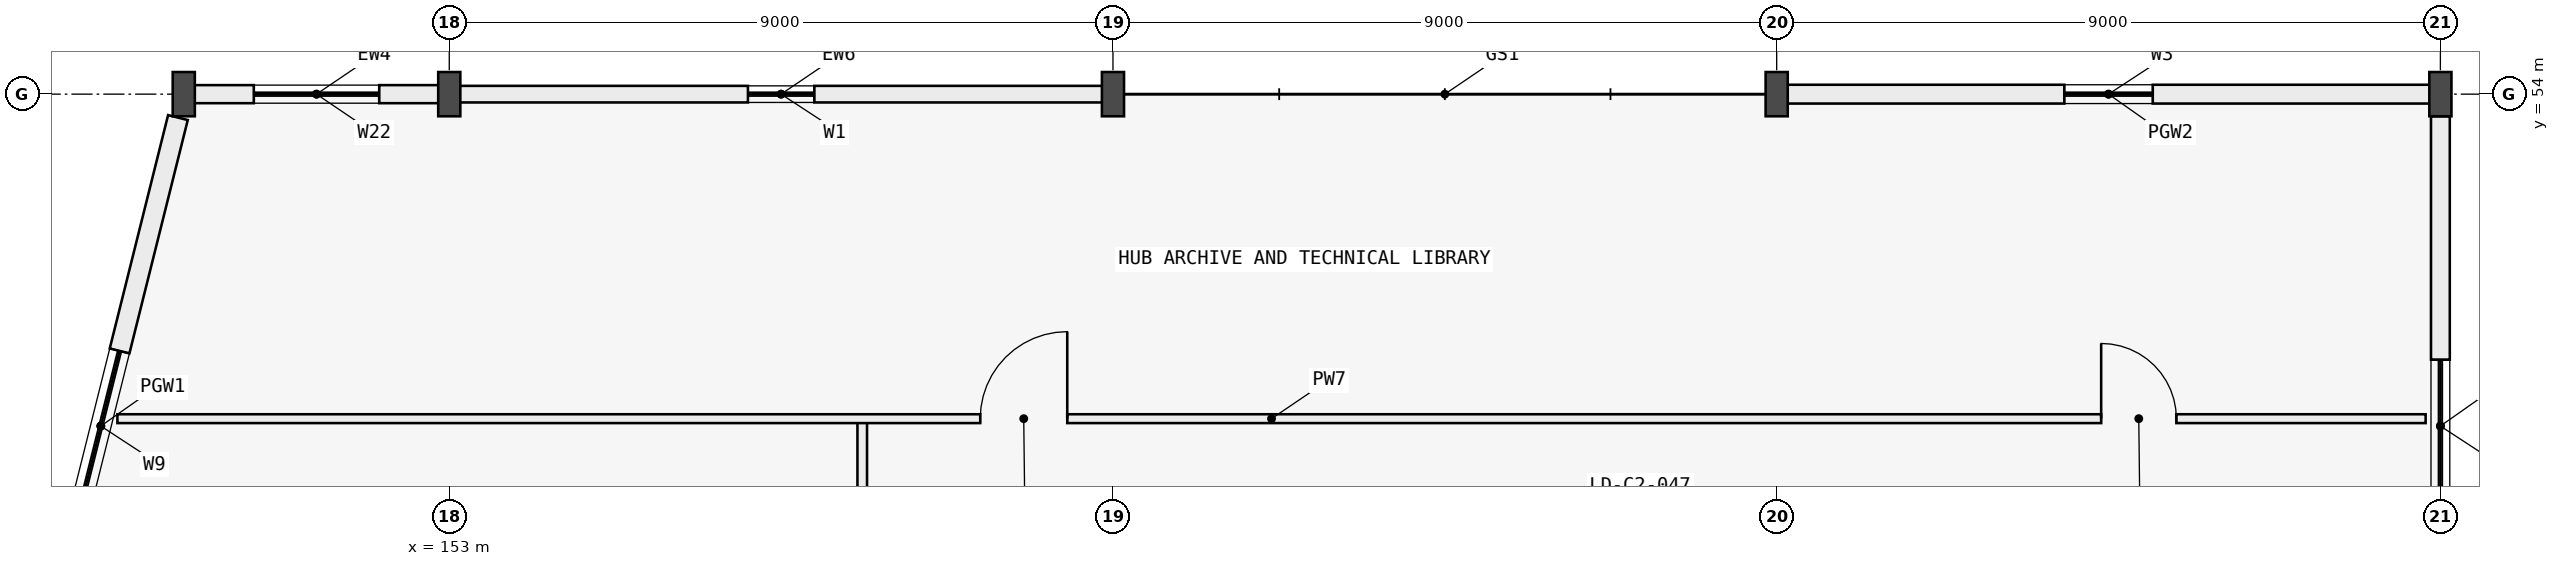
"""IFC4 building model, lengths in metres.
Left out: names, types, materials, properties, quantities, classifications, styles, units other than length and angle.
Written with IfcOpenShell. Run it as: python <this file> out.ifc"""

import sys

from ifc_helpers import new_model, si_unit, direction, frame, frame_2d, origin, origin_2d, place, context, subcontext, project, spatial, rectangle, i_section, extrude, element, fill, save


model = new_model("IFC4")
c1 = context("Model", 3, precision=1e-05, world=origin(), true_north=direction((0.0, 1.0)))
c2 = subcontext(c1, "Body", "Model", "MODEL_VIEW")
j1 = project(units=[si_unit("LENGTHUNIT", "METRE"), si_unit("PLANEANGLEUNIT", "RADIAN")], contexts=[c1])
p1 = place(None, origin())
s1 = spatial("IfcSite", under=j1, at=p1, CompositionType="ELEMENT")
p2 = place(p1, origin())
s2 = spatial("IfcBuilding", under=s1, at=p2, CompositionType="ELEMENT")
p3 = place(p2, frame((0.0, 0.0, 25.2)))
s3 = spatial("IfcBuildingStorey", under=s2, at=p3, CompositionType="ELEMENT", Elevation=25.2)
for number, where, z_axis, x_axis in (
    (1, (149.4, 54.0, 0.0), (0.0, 0.0, 1.0), (1.0, 0.0, 0.0)),
    (2, (153.0, 54.0, 0.0), (0.0, 0.0, 1.0), (1.0, 0.0, 0.0)),
    (3, (162.0, 54.0, 0.0), (0.0, 0.0, 1.0), (1.0, 0.0, 0.0)),
    (4, (171.0, 54.0, 0.0), (0.0, 0.0, 1.0), (1.0, 0.0, 0.0)),
    (5, (180.0, 54.0, 0.0), (0.0, 0.0, 1.0), (1.0, 0.0, 0.0)),
):
    element("IfcColumn", number, at=place(p3, frame(where, z_axis=z_axis, x_axis=x_axis)), inside=s3, PredefinedType="COLUMN", context=c2, shape_type="SweptSolid", body=[
        extrude(i_section(OverallWidth=0.3, OverallDepth=0.6, WebThickness=0.015, FlangeThickness=0.03, FilletRadius=0.027, at=origin_2d()), origin(), (0.0, 0.0, 1.0), 4.2),
    ])
p4 = place(p3, frame((180.0, 45.3, 0.0), z_axis=(0.0, 0.0, 1.0), x_axis=(0.0, 1.0, 0.0)))
e6 = element("IfcWall", 6, at=p4, inside=s3, PredefinedType="POLYGONAL", context=c2, shape_type="SweptSolid", body=[
    extrude(rectangle(XDim=8.4, YDim=0.255, at=frame_2d((4.2, 0.0))), origin(), (0.0, 0.0, 1.0), 3.635),
])
p5 = place(p4, frame((3.3, 0.0, 0.95)))
e7 = element("IfcOpeningElement", 7, at=p5, cuts=e6, PredefinedType="OPENING", context=c2, shape_type="SweptSolid", body=[
    extrude(rectangle(XDim=1.8, YDim=1.6, at=frame_2d((0.9, 0.8))), frame((0.0, 0.137, 0.0), z_axis=(0.0, -1.0, 0.0), x_axis=(1.0, 0.0, 0.0)), (0.0, 0.0, 1.0), 0.275),
])
p6 = place(p3, frame((149.408, 54.0, 0.0), z_axis=(0.0, 0.0, 1.0), x_axis=(1.0, 0.0, 0.0)))
e8 = element("IfcWall", 8, at=p6, inside=s3, PredefinedType="STANDARD", context=c2, shape_type="SweptSolid", body=[
    extrude(rectangle(XDim=3.584, YDim=0.245, at=frame_2d((1.792, 0.0))), origin(), (0.0, 0.0, 1.0), 3.635),
])
p7 = place(p6, frame((0.942, 0.0, 0.95)))
e9 = element("IfcOpeningElement", 9, at=p7, cuts=e8, PredefinedType="OPENING", context=c2, shape_type="SweptSolid", body=[
    extrude(rectangle(XDim=1.7, YDim=2.1, at=frame_2d((0.85, 1.05))), frame((0.0, 0.133, 0.0), z_axis=(0.0, -1.0, 0.0), x_axis=(1.0, 0.0, 0.0)), (0.0, 0.0, 1.0), 0.265),
])
p8 = place(p3, frame((153.008, 54.0, 0.0), z_axis=(0.0, 0.0, 1.0), x_axis=(1.0, 0.0, 0.0)))
e10 = element("IfcWall", 10, at=p8, inside=s3, PredefinedType="STANDARD", context=c2, shape_type="SweptSolid", body=[
    extrude(rectangle(XDim=8.984, YDim=0.225, at=frame_2d((4.492, 0.0))), origin(), (0.0, 0.0, 1.0), 3.635),
])
p9 = place(p8, frame((4.042, 0.0, 0.95)))
e11 = element("IfcOpeningElement", 11, at=p9, cuts=e10, PredefinedType="OPENING", context=c2, shape_type="SweptSolid", body=[
    extrude(rectangle(XDim=0.9, YDim=1.2, at=frame_2d((0.45, 0.6))), frame((0.0, 0.123, 0.0), z_axis=(0.0, -1.0, 0.0), x_axis=(1.0, 0.0, 0.0)), (0.0, 0.0, 1.0), 0.245),
])
p10 = place(p3, frame((171.008, 54.0, 0.0), z_axis=(0.0, 0.0, 1.0), x_axis=(1.0, 0.0, 0.0)))
e12 = element("IfcWall", 12, at=p10, inside=s3, PredefinedType="POLYGONAL", context=c2, shape_type="SweptSolid", body=[
    extrude(rectangle(XDim=8.984, YDim=0.255, at=frame_2d((4.492, 0.0))), origin(), (0.0, 0.0, 1.0), 3.635),
])
p11 = place(p10, frame((3.892, 0.0, 0.95)))
e13 = element("IfcOpeningElement", 13, at=p11, cuts=e12, PredefinedType="OPENING", context=c2, shape_type="SweptSolid", body=[
    extrude(rectangle(XDim=1.2, YDim=1.35, at=frame_2d((0.6, 0.675))), frame((0.0, 0.137, 0.0), z_axis=(0.0, -1.0, 0.0), x_axis=(1.0, 0.0, 0.0)), (0.0, 0.0, 1.0), 0.275),
])
p12 = place(p3, frame((147.229, 45.318, 0.0), z_axis=(0.0, 0.0, 1.0), x_axis=(0.24252230007, 0.97014583129, 0.0)))
e14 = element("IfcWall", 14, at=p12, inside=s3, PredefinedType="POLYGONAL", context=c2, shape_type="SweptSolid", body=[
    extrude(rectangle(XDim=8.622, YDim=0.275, at=frame_2d((4.311, 0.0))), origin(), (0.0, 0.0, 1.0), 3.96),
])
p13 = place(p12, frame((3.261, 0.0, 0.95)))
e15 = element("IfcOpeningElement", 15, at=p13, cuts=e14, PredefinedType="OPENING", context=c2, shape_type="SweptSolid", body=[
    extrude(rectangle(XDim=2.1, YDim=1.7, at=frame_2d((1.05, 0.85))), frame((0.0, 0.147, 0.0), z_axis=(0.0, -1.0, 0.0), x_axis=(1.0, 0.0, 0.0)), (0.0, 0.0, 1.0), 0.295),
])
p14 = place(p3, frame((158.6, 36.2, 0.0), z_axis=(0.0, 0.0, 1.0), x_axis=(0.0, 1.0, 0.0)))
e16 = element("IfcWall", 16, at=p14, inside=s3, PredefinedType="PARTITIONING", context=c2, shape_type="SweptSolid", body=[
    extrude(rectangle(XDim=13.4, YDim=0.13, at=frame_2d((6.7, 0.0))), origin(), (0.0, 0.0, 1.0), 3.665),
])
p15 = place(p14, frame((6.1, 0.0, 0.0)))
e17 = element("IfcOpeningElement", 17, at=p15, cuts=e16, PredefinedType="OPENING", context=c2, shape_type="SweptSolid", body=[
    extrude(rectangle(XDim=1.08, YDim=2.12, at=frame_2d((0.54, 1.06))), frame((0.0, 0.075, 0.0), z_axis=(0.0, -1.0, 0.0), x_axis=(1.0, 0.0, 0.0)), (0.0, 0.0, 1.0), 0.15),
])
p16 = place(p3, frame((148.5, 49.6, 0.0), z_axis=(0.0, 0.0, 1.0), x_axis=(1.0, 0.0, 0.0)))
e18 = element("IfcWall", 18, at=p16, inside=s3, PredefinedType="PARTITIONING", context=c2, shape_type="SweptSolid", body=[
    extrude(rectangle(XDim=31.3, YDim=0.12, at=frame_2d((15.65, 0.0))), origin(), (0.0, 0.0, 1.0), 3.96),
])
p17 = place(p16, frame((11.7, 0.0, 0.0)))
e19 = element("IfcOpeningElement", 19, at=p17, cuts=e18, PredefinedType="OPENING", context=c2, shape_type="SweptSolid", body=[
    extrude(rectangle(XDim=1.18, YDim=2.15, at=frame_2d((0.59, 1.075))), frame((0.0, 0.07, 0.0), z_axis=(0.0, -1.0, 0.0), x_axis=(1.0, 0.0, 0.0)), (0.0, 0.0, 1.0), 0.14),
])
p18 = place(p16, frame((26.9, 0.0, 0.0)))
e20 = element("IfcOpeningElement", 20, at=p18, cuts=e18, PredefinedType="OPENING", context=c2, shape_type="SweptSolid", body=[
    extrude(rectangle(XDim=1.02, YDim=2.12, at=frame_2d((0.51, 1.06))), frame((0.0, 0.07, 0.0), z_axis=(0.0, -1.0, 0.0), x_axis=(1.0, 0.0, 0.0)), (0.0, 0.0, 1.0), 0.14),
])
p19 = place(p5, origin())
e21 = element("IfcWindow", 21, at=p19, inside=s3, PartitioningType="SINGLE_PANEL", PredefinedType="WINDOW", context=c2, shape_type="SweptSolid", body=[
    extrude(rectangle(XDim=1.8, YDim=1.6, at=frame_2d((0.9, 0.8))), frame((0.0, 0.03, 0.0), z_axis=(0.0, -1.0, 0.0), x_axis=(1.0, 0.0, 0.0)), (0.0, 0.0, 1.0), 0.06),
])
fill(e7, e21)
p20 = place(p7, origin())
e22 = element("IfcWindow", 22, at=p20, inside=s3, PartitioningType="SINGLE_PANEL", PredefinedType="WINDOW", context=c2, shape_type="SweptSolid", body=[
    extrude(rectangle(XDim=1.7, YDim=2.1, at=frame_2d((0.85, 1.05))), frame((0.0, 0.03, 0.0), z_axis=(0.0, -1.0, 0.0), x_axis=(1.0, 0.0, 0.0)), (0.0, 0.0, 1.0), 0.06),
])
fill(e9, e22)
p21 = place(p9, origin())
e23 = element("IfcWindow", 23, at=p21, inside=s3, PartitioningType="SINGLE_PANEL", PredefinedType="WINDOW", context=c2, shape_type="SweptSolid", body=[
    extrude(rectangle(XDim=0.9, YDim=1.2, at=frame_2d((0.45, 0.6))), frame((0.0, 0.03, 0.0), z_axis=(0.0, -1.0, 0.0), x_axis=(1.0, 0.0, 0.0)), (0.0, 0.0, 1.0), 0.06),
])
fill(e11, e23)
p22 = place(p11, origin())
e24 = element("IfcWindow", 24, at=p22, inside=s3, PartitioningType="SINGLE_PANEL", PredefinedType="WINDOW", context=c2, shape_type="SweptSolid", body=[
    extrude(rectangle(XDim=1.2, YDim=1.35, at=frame_2d((0.6, 0.675))), frame((0.0, 0.03, 0.0), z_axis=(0.0, -1.0, 0.0), x_axis=(1.0, 0.0, 0.0)), (0.0, 0.0, 1.0), 0.06),
])
fill(e13, e24)
p23 = place(p13, origin())
e25 = element("IfcWindow", 25, at=p23, inside=s3, PartitioningType="SINGLE_PANEL", PredefinedType="WINDOW", context=c2, shape_type="SweptSolid", body=[
    extrude(rectangle(XDim=2.1, YDim=1.7, at=frame_2d((1.05, 0.85))), frame((0.0, 0.03, 0.0), z_axis=(0.0, -1.0, 0.0), x_axis=(1.0, 0.0, 0.0)), (0.0, 0.0, 1.0), 0.06),
])
fill(e15, e25)
p24 = place(p17, origin())
e26 = element("IfcDoor", 26, at=p24, inside=s3, OperationType="SINGLE_SWING_RIGHT", PredefinedType="DOOR", context=c2, shape_type="SweptSolid", body=[
    extrude(rectangle(XDim=1.18, YDim=2.15, at=frame_2d((0.59, 1.075))), frame((0.0, 0.025, 0.0), z_axis=(0.0, -1.0, 0.0), x_axis=(1.0, 0.0, 0.0)), (0.0, 0.0, 1.0), 0.05),
])
fill(e19, e26)
p25 = place(p18, origin())
e27 = element("IfcDoor", 27, at=p25, inside=s3, OperationType="SINGLE_SWING_LEFT", PredefinedType="DOOR", context=c2, shape_type="SweptSolid", body=[
    extrude(rectangle(XDim=1.02, YDim=2.12, at=frame_2d((0.51, 1.06))), frame((0.0, 0.025, 0.0), z_axis=(0.0, -1.0, 0.0), x_axis=(1.0, 0.0, 0.0)), (0.0, 0.0, 1.0), 0.05),
])
fill(e20, e27)
save(model, sys.argv[1])
